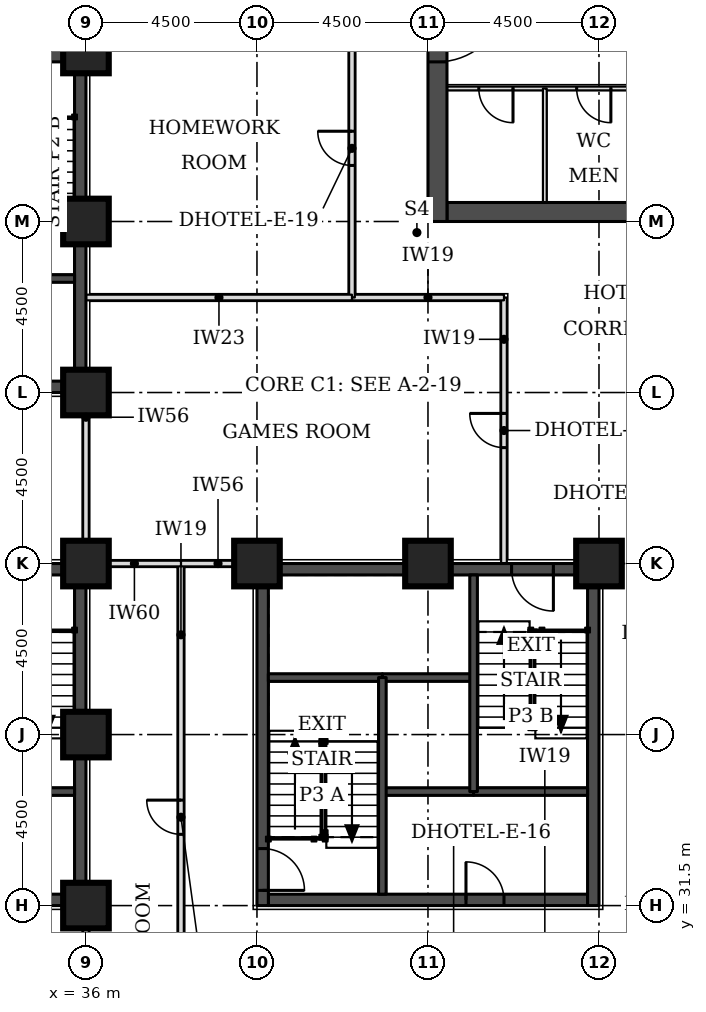
"""IFC4 building model, lengths in metres.
Left out: names, types, materials, properties, quantities, classifications, styles, units other than length and angle.
Written with IfcOpenShell. Run it as: python <this file> out.ifc"""

import sys

from ifc_helpers import new_model, si_unit, direction, frame, frame_2d, origin, origin_2d, place, context, subcontext, project, spatial, rectangle, extrude, element, fill, save


model = new_model("IFC4")
c1 = context("Model", 3, precision=1e-05, world=origin(), true_north=direction((0.0, 1.0)))
c2 = subcontext(c1, "Body", "Model", "MODEL_VIEW")
j1 = project(units=[si_unit("LENGTHUNIT", "METRE"), si_unit("PLANEANGLEUNIT", "RADIAN")], contexts=[c1])
p1 = place(None, origin())
s1 = spatial("IfcSite", under=j1, at=p1, CompositionType="ELEMENT")
p2 = place(p1, origin())
s2 = spatial("IfcBuilding", under=s1, at=p2, CompositionType="ELEMENT")
p3 = place(p2, frame((0.0, 0.0, 62.7)))
s3 = spatial("IfcBuildingStorey", under=s2, at=p3, CompositionType="ELEMENT", Elevation=62.7)
for number, where, z_axis, x_axis in (
    (1, (36.0, 31.5, 0.0), (0.0, 0.0, 1.0), (1.0, 0.0, 0.0)),
    (2, (36.0, 36.0, 0.0), (0.0, 0.0, 1.0), (1.0, 0.0, 0.0)),
    (3, (36.0, 40.5, 0.0), (0.0, 0.0, 1.0), (1.0, 0.0, 0.0)),
    (4, (40.5, 40.5, 0.0), (0.0, 0.0, 1.0), (1.0, 0.0, 0.0)),
    (5, (45.0, 40.5, 0.0), (0.0, 0.0, 1.0), (1.0, 0.0, 0.0)),
    (6, (49.5, 40.5, 0.0), (0.0, 0.0, 1.0), (1.0, 0.0, 0.0)),
    (7, (36.0, 45.0, 0.0), (0.0, 0.0, 1.0), (1.0, 0.0, 0.0)),
    (8, (36.0, 49.5, 0.0), (0.0, 0.0, 1.0), (1.0, 0.0, 0.0)),
    (9, (36.0, 54.0, 0.0), (0.0, 0.0, 1.0), (1.0, 0.0, 0.0)),
):
    element("IfcColumn", number, at=place(p3, frame(where, z_axis=z_axis, x_axis=x_axis)), inside=s3, PredefinedType="COLUMN", context=c2, shape_type="SweptSolid", body=[
        extrude(rectangle(XDim=1.2, YDim=1.2, at=origin_2d()), origin(), (0.0, 0.0, 1.0), 3.3),
    ])
p4 = place(p3, frame((45.5, 49.75, 0.0), z_axis=(0.0, 0.0, 1.0), x_axis=(1.0, 0.0, 0.0)))
e10 = element("IfcWall", 10, at=p4, inside=s3, PredefinedType="SHEAR", context=c2, shape_type="SweptSolid", body=[
    extrude(rectangle(XDim=21.5, YDim=0.5, at=frame_2d((10.75, 0.0))), origin(), (0.0, 0.0, 1.0), 3.3),
])
p5 = place(p3, frame((45.25, 49.5, 0.0), z_axis=(0.0, 0.0, 1.0), x_axis=(0.0, 1.0, 0.0)))
e11 = element("IfcWall", 11, at=p5, inside=s3, PredefinedType="SHEAR", context=c2, shape_type="SweptSolid", body=[
    extrude(rectangle(XDim=22.5, YDim=0.5, at=frame_2d((11.25, 0.0))), origin(), (0.0, 0.0, 1.0), 3.3),
])
p6 = place(p5, frame((4.2, 0.0, 0.0)))
e12 = element("IfcOpeningElement", 12, at=p6, cuts=e11, PredefinedType="OPENING", context=c2, shape_type="SweptSolid", body=[
    extrude(rectangle(XDim=1.8, YDim=2.1, at=frame_2d((0.9, 1.05))), frame((0.0, 0.26, 0.0), z_axis=(0.0, -1.0, 0.0), x_axis=(1.0, 0.0, 0.0)), (0.0, 0.0, 1.0), 0.52),
])
p7 = place(p5, frame((6.9, 0.0, 0.0)))
e13 = element("IfcOpeningElement", 13, at=p7, cuts=e11, PredefinedType="OPENING", context=c2, shape_type="SweptSolid", body=[
    extrude(rectangle(XDim=1.1, YDim=2.1, at=frame_2d((0.55, 1.05))), frame((0.0, 0.26, 0.0), z_axis=(0.0, -1.0, 0.0), x_axis=(1.0, 0.0, 0.0)), (0.0, 0.0, 1.0), 0.52),
])
p8 = place(p5, frame((13.6, 0.0, 0.0)))
e14 = element("IfcOpeningElement", 14, at=p8, cuts=e11, PredefinedType="OPENING", context=c2, shape_type="SweptSolid", body=[
    extrude(rectangle(XDim=1.1, YDim=2.1, at=frame_2d((0.55, 1.05))), frame((0.0, 0.26, 0.0), z_axis=(0.0, -1.0, 0.0), x_axis=(1.0, 0.0, 0.0)), (0.0, 0.0, 1.0), 0.52),
])
p9 = place(p5, frame((16.5, 0.0, 0.0)))
e15 = element("IfcOpeningElement", 15, at=p9, cuts=e11, PredefinedType="OPENING", context=c2, shape_type="SweptSolid", body=[
    extrude(rectangle(XDim=1.8, YDim=2.1, at=frame_2d((0.9, 1.05))), frame((0.0, 0.26, 0.0), z_axis=(0.0, -1.0, 0.0), x_axis=(1.0, 0.0, 0.0)), (0.0, 0.0, 1.0), 0.52),
])
p10 = place(p3, frame((27.3, 45.15, 0.0), z_axis=(0.0, 0.0, 1.0), x_axis=(1.0, 0.0, 0.0)))
e16 = element("IfcWall", 16, at=p10, inside=s3, PredefinedType="SHEAR", context=c2, shape_type="SweptSolid", body=[
    extrude(rectangle(XDim=8.4, YDim=0.3, at=frame_2d((4.2, 0.0))), origin(), (0.0, 0.0, 1.0), 3.3),
])
p11 = place(p10, frame((5.2, 0.0, 0.0)))
e17 = element("IfcOpeningElement", 17, at=p11, cuts=e16, PredefinedType="OPENING", context=c2, shape_type="SweptSolid", body=[
    extrude(rectangle(XDim=1.0, YDim=2.1, at=frame_2d((0.5, 1.05))), frame((0.0, 0.16, 0.0), z_axis=(0.0, -1.0, 0.0), x_axis=(1.0, 0.0, 0.0)), (0.0, 0.0, 1.0), 0.32),
])
p12 = place(p3, frame((27.3, 53.85, 0.0), z_axis=(0.0, 0.0, 1.0), x_axis=(1.0, 0.0, 0.0)))
e18 = element("IfcWall", 18, at=p12, inside=s3, PredefinedType="SHEAR", context=c2, shape_type="SweptSolid", body=[
    extrude(rectangle(XDim=8.4, YDim=0.3, at=frame_2d((4.2, 0.0))), origin(), (0.0, 0.0, 1.0), 3.3),
])
p13 = place(p12, frame((6.4, 0.0, 0.0)))
e19 = element("IfcOpeningElement", 19, at=p13, cuts=e18, PredefinedType="OPENING", context=c2, shape_type="SweptSolid", body=[
    extrude(rectangle(XDim=1.1, YDim=2.1, at=frame_2d((0.55, 1.05))), frame((0.0, 0.16, 0.0), z_axis=(0.0, -1.0, 0.0), x_axis=(1.0, 0.0, 0.0)), (0.0, 0.0, 1.0), 0.32),
])
p14 = place(p3, frame((35.85, 45.0, 0.0), z_axis=(0.0, 0.0, 1.0), x_axis=(0.0, 1.0, 0.0)))
e20 = element("IfcWall", 20, at=p14, inside=s3, PredefinedType="SHEAR", context=c2, shape_type="SweptSolid", body=[
    extrude(rectangle(XDim=9.0, YDim=0.3, at=frame_2d((4.5, 0.0))), origin(), (0.0, 0.0, 1.0), 3.3),
])
p15 = place(p3, frame((40.8, 31.65, 0.0), z_axis=(0.0, 0.0, 1.0), x_axis=(1.0, 0.0, 0.0)))
e21 = element("IfcWall", 21, at=p15, inside=s3, PredefinedType="SHEAR", context=c2, shape_type="SweptSolid", body=[
    extrude(rectangle(XDim=8.4, YDim=0.3, at=frame_2d((4.2, 0.0))), origin(), (0.0, 0.0, 1.0), 3.3),
])
p16 = place(p15, frame((5.2, 0.0, 0.0)))
e22 = element("IfcOpeningElement", 22, at=p16, cuts=e21, PredefinedType="OPENING", context=c2, shape_type="SweptSolid", body=[
    extrude(rectangle(XDim=1.0, YDim=2.1, at=frame_2d((0.5, 1.05))), frame((0.0, 0.16, 0.0), z_axis=(0.0, -1.0, 0.0), x_axis=(1.0, 0.0, 0.0)), (0.0, 0.0, 1.0), 0.32),
])
p17 = place(p3, frame((40.8, 40.35, 0.0), z_axis=(0.0, 0.0, 1.0), x_axis=(1.0, 0.0, 0.0)))
e23 = element("IfcWall", 23, at=p17, inside=s3, PredefinedType="SHEAR", context=c2, shape_type="SweptSolid", body=[
    extrude(rectangle(XDim=8.4, YDim=0.3, at=frame_2d((4.2, 0.0))), origin(), (0.0, 0.0, 1.0), 3.3),
])
p18 = place(p17, frame((6.4, 0.0, 0.0)))
e24 = element("IfcOpeningElement", 24, at=p18, cuts=e23, PredefinedType="OPENING", context=c2, shape_type="SweptSolid", body=[
    extrude(rectangle(XDim=1.1, YDim=2.1, at=frame_2d((0.55, 1.05))), frame((0.0, 0.16, 0.0), z_axis=(0.0, -1.0, 0.0), x_axis=(1.0, 0.0, 0.0)), (0.0, 0.0, 1.0), 0.32),
])
p19 = place(p3, frame((40.65, 31.5, 0.0), z_axis=(0.0, 0.0, 1.0), x_axis=(0.0, 1.0, 0.0)))
e25 = element("IfcWall", 25, at=p19, inside=s3, PredefinedType="SHEAR", context=c2, shape_type="SweptSolid", body=[
    extrude(rectangle(XDim=9.0, YDim=0.3, at=frame_2d((4.5, 0.0))), origin(), (0.0, 0.0, 1.0), 3.3),
])
p20 = place(p19, frame((0.4, 0.0, 0.0)))
e26 = element("IfcOpeningElement", 26, at=p20, cuts=e25, PredefinedType="OPENING", context=c2, shape_type="SweptSolid", body=[
    extrude(rectangle(XDim=1.1, YDim=2.1, at=frame_2d((0.55, 1.05))), frame((0.0, 0.16, 0.0), z_axis=(0.0, -1.0, 0.0), x_axis=(1.0, 0.0, 0.0)), (0.0, 0.0, 1.0), 0.32),
])
p21 = place(p3, frame((49.35, 31.5, 0.0), z_axis=(0.0, 0.0, 1.0), x_axis=(0.0, 1.0, 0.0)))
e27 = element("IfcWall", 27, at=p21, inside=s3, PredefinedType="SHEAR", context=c2, shape_type="SweptSolid", body=[
    extrude(rectangle(XDim=9.0, YDim=0.3, at=frame_2d((4.5, 0.0))), origin(), (0.0, 0.0, 1.0), 3.3),
])
p22 = place(p3, frame((27.3, 31.65, 0.0), z_axis=(0.0, 0.0, 1.0), x_axis=(1.0, 0.0, 0.0)))
e28 = element("IfcWall", 28, at=p22, inside=s3, PredefinedType="SHEAR", context=c2, shape_type="SweptSolid", body=[
    extrude(rectangle(XDim=8.4, YDim=0.3, at=frame_2d((4.2, 0.0))), origin(), (0.0, 0.0, 1.0), 3.3),
])
p23 = place(p22, frame((4.8, 0.0, 0.0)))
e29 = element("IfcOpeningElement", 29, at=p23, cuts=e28, PredefinedType="OPENING", context=c2, shape_type="SweptSolid", body=[
    extrude(rectangle(XDim=1.8, YDim=2.1, at=frame_2d((0.9, 1.05))), frame((0.0, 0.16, 0.0), z_axis=(0.0, -1.0, 0.0), x_axis=(1.0, 0.0, 0.0)), (0.0, 0.0, 1.0), 0.32),
])
p24 = place(p3, frame((27.3, 40.35, 0.0), z_axis=(0.0, 0.0, 1.0), x_axis=(1.0, 0.0, 0.0)))
e30 = element("IfcWall", 30, at=p24, inside=s3, PredefinedType="SHEAR", context=c2, shape_type="SweptSolid", body=[
    extrude(rectangle(XDim=8.4, YDim=0.3, at=frame_2d((4.2, 0.0))), origin(), (0.0, 0.0, 1.0), 3.3),
])
p25 = place(p24, frame((6.4, 0.0, 0.0)))
e31 = element("IfcOpeningElement", 31, at=p25, cuts=e30, PredefinedType="OPENING", context=c2, shape_type="SweptSolid", body=[
    extrude(rectangle(XDim=1.1, YDim=2.1, at=frame_2d((0.55, 1.05))), frame((0.0, 0.16, 0.0), z_axis=(0.0, -1.0, 0.0), x_axis=(1.0, 0.0, 0.0)), (0.0, 0.0, 1.0), 0.32),
])
p26 = place(p3, frame((35.85, 31.5, 0.0), z_axis=(0.0, 0.0, 1.0), x_axis=(0.0, 1.0, 0.0)))
e32 = element("IfcWall", 32, at=p26, inside=s3, PredefinedType="SHEAR", context=c2, shape_type="SweptSolid", body=[
    extrude(rectangle(XDim=9.0, YDim=0.3, at=frame_2d((4.5, 0.0))), origin(), (0.0, 0.0, 1.0), 3.3),
])
p27 = place(p3, frame((38.5, 27.15, 0.0), z_axis=(0.0, 0.0, 1.0), x_axis=(0.0, 1.0, 0.0)))
e33 = element("IfcWall", 33, at=p27, inside=s3, PredefinedType="PARTITIONING", context=c2, shape_type="SweptSolid", body=[
    extrude(rectangle(XDim=13.35, YDim=0.15, at=frame_2d((6.675, 0.0))), origin(), (0.0, 0.0, 1.0), 3.08),
])
p28 = place(p27, frame((6.225, 0.0, 0.0)))
e34 = element("IfcOpeningElement", 34, at=p28, cuts=e33, PredefinedType="OPENING", context=c2, shape_type="SweptSolid", body=[
    extrude(rectangle(XDim=0.9, YDim=2.1, at=frame_2d((0.45, 1.05))), frame((0.0, 0.085, 0.0), z_axis=(0.0, -1.0, 0.0), x_axis=(1.0, 0.0, 0.0)), (0.0, 0.0, 1.0), 0.17),
])
for number, where, z_axis, x_axis in (
    (35, (36.0, 29.5, 0.0), (0.0, 0.0, 1.0), (0.0, 1.0, 0.0)),
    (36, (38.5, 40.5, 0.0), (0.0, 0.0, 1.0), (1.0, 0.0, 0.0)),
):
    element("IfcWall", number, at=place(p3, frame(where, z_axis=z_axis, x_axis=x_axis)), inside=s3, PredefinedType="PARTITIONING", context=c2, shape_type="SweptSolid", body=[
        extrude(rectangle(XDim=1.95, YDim=0.15, at=frame_2d((0.975, 0.0))), origin(), (0.0, 0.0, 1.0), 2.33),
    ])
p29 = place(p3, frame((36.0, 40.55, 0.0), z_axis=(0.0, 0.0, 1.0), x_axis=(0.0, 1.0, 0.0)))
e37 = element("IfcWall", 37, at=p29, inside=s3, PredefinedType="PARTITIONING", context=c2, shape_type="SweptSolid", body=[
    extrude(rectangle(XDim=4.4, YDim=0.15, at=frame_2d((2.2, 0.0))), origin(), (0.0, 0.0, 1.0), 2.33),
])
p30 = place(p3, frame((47.0, 40.5, 0.0), z_axis=(0.0, 0.0, 1.0), x_axis=(0.0, 1.0, 0.0)))
e38 = element("IfcWall", 38, at=p30, inside=s3, PredefinedType="PARTITIONING", context=c2, shape_type="SweptSolid", body=[
    extrude(rectangle(XDim=7.0, YDim=0.15, at=frame_2d((3.5, 0.0))), origin(), (0.0, 0.0, 1.0), 3.08),
])
p31 = place(p30, frame((3.05, 0.0, 0.0)))
e39 = element("IfcOpeningElement", 39, at=p31, cuts=e38, PredefinedType="OPENING", context=c2, shape_type="SweptSolid", body=[
    extrude(rectangle(XDim=0.9, YDim=2.1, at=frame_2d((0.45, 1.05))), frame((0.0, 0.085, 0.0), z_axis=(0.0, -1.0, 0.0), x_axis=(1.0, 0.0, 0.0)), (0.0, 0.0, 1.0), 0.17),
])
p32 = place(p3, frame((43.0, 47.5, 0.0), z_axis=(0.0, 0.0, 1.0), x_axis=(1.0, 0.0, 0.0)))
e40 = element("IfcWall", 40, at=p32, inside=s3, PredefinedType="PARTITIONING", context=c2, shape_type="SweptSolid", body=[
    extrude(rectangle(XDim=4.0, YDim=0.15, at=frame_2d((2.0, 0.0))), origin(), (0.0, 0.0, 1.0), 3.08),
])
p33 = place(p3, frame((43.0, 47.5, 0.0), z_axis=(0.0, 0.0, 1.0), x_axis=(0.0, 1.0, 0.0)))
e41 = element("IfcWall", 41, at=p33, inside=s3, PredefinedType="PARTITIONING", context=c2, shape_type="SweptSolid", body=[
    extrude(rectangle(XDim=7.85, YDim=0.15, at=frame_2d((3.925, 0.0))), origin(), (0.0, 0.0, 1.0), 3.08),
])
p34 = place(p33, frame((3.475, 0.0, 0.0)))
e42 = element("IfcOpeningElement", 42, at=p34, cuts=e41, PredefinedType="OPENING", context=c2, shape_type="SweptSolid", body=[
    extrude(rectangle(XDim=0.9, YDim=2.1, at=frame_2d((0.45, 1.05))), frame((0.0, 0.085, 0.0), z_axis=(0.0, -1.0, 0.0), x_axis=(1.0, 0.0, 0.0)), (0.0, 0.0, 1.0), 0.17),
])
p35 = place(p3, frame((36.05, 40.5, 0.0), z_axis=(0.0, 0.0, 1.0), x_axis=(1.0, 0.0, 0.0)))
e43 = element("IfcWall", 43, at=p35, inside=s3, PredefinedType="PARTITIONING", context=c2, shape_type="SweptSolid", body=[
    extrude(rectangle(XDim=2.45, YDim=0.15, at=frame_2d((1.225, 0.0))), origin(), (0.0, 0.0, 1.0), 2.33),
])
p36 = place(p3, frame((36.0, 47.5, 0.0), z_axis=(0.0, 0.0, 1.0), x_axis=(1.0, 0.0, 0.0)))
e44 = element("IfcWall", 44, at=p36, inside=s3, PredefinedType="PARTITIONING", context=c2, shape_type="SweptSolid", body=[
    extrude(rectangle(XDim=7.0, YDim=0.15, at=frame_2d((3.5, 0.0))), origin(), (0.0, 0.0, 1.0), 3.08),
])
p37 = place(p3, frame((45.5, 53.0, 0.0), z_axis=(0.0, 0.0, 1.0), x_axis=(1.0, 0.0, 0.0)))
e45 = element("IfcWall", 45, at=p37, inside=s3, PredefinedType="PARTITIONING", context=c2, shape_type="SweptSolid", body=[
    extrude(rectangle(XDim=5.15, YDim=0.1, at=frame_2d((2.575, 0.0))), origin(), (0.0, 0.0, 1.0), 3.08),
])
p38 = place(p37, frame((0.837, 0.0, 0.0)))
e46 = element("IfcOpeningElement", 46, at=p38, cuts=e45, PredefinedType="OPENING", context=c2, shape_type="SweptSolid", body=[
    extrude(rectangle(XDim=0.9, YDim=2.1, at=frame_2d((0.45, 1.05))), frame((0.0, 0.06, 0.0), z_axis=(0.0, -1.0, 0.0), x_axis=(1.0, 0.0, 0.0)), (0.0, 0.0, 1.0), 0.12),
])
p39 = place(p37, frame((3.413, 0.0, 0.0)))
e47 = element("IfcOpeningElement", 47, at=p39, cuts=e45, PredefinedType="OPENING", context=c2, shape_type="SweptSolid", body=[
    extrude(rectangle(XDim=0.9, YDim=2.1, at=frame_2d((0.45, 1.05))), frame((0.0, 0.06, 0.0), z_axis=(0.0, -1.0, 0.0), x_axis=(1.0, 0.0, 0.0)), (0.0, 0.0, 1.0), 0.12),
])
p40 = place(p3, frame((48.075, 50.0, 0.0), z_axis=(0.0, 0.0, 1.0), x_axis=(0.0, 1.0, 0.0)))
e48 = element("IfcWall", 48, at=p40, inside=s3, PredefinedType="PARTITIONING", context=c2, shape_type="SweptSolid", body=[
    extrude(rectangle(XDim=3.0, YDim=0.1, at=frame_2d((1.5, 0.0))), origin(), (0.0, 0.0, 1.0), 3.08),
])
p41 = place(p3, frame((32.7, 48.0, 0.0), z_axis=(0.0, 0.0, 1.0), x_axis=(1.0, 0.0, 0.0)))
e49 = element("IfcWall", 49, at=p41, inside=s3, PredefinedType="SOLIDWALL", context=c2, shape_type="SweptSolid", body=[
    extrude(rectangle(XDim=3.0, YDim=0.2, at=frame_2d((1.5, 0.0))), origin(), (0.0, 0.0, 1.0), 3.08),
])
p42 = place(p3, frame((43.8, 34.5, 0.0), z_axis=(0.0, 0.0, 1.0), x_axis=(1.0, 0.0, 0.0)))
e50 = element("IfcWall", 50, at=p42, inside=s3, PredefinedType="SOLIDWALL", context=c2, shape_type="SweptSolid", body=[
    extrude(rectangle(XDim=2.4, YDim=0.2, at=frame_2d((1.2, 0.0))), origin(), (0.0, 0.0, 1.0), 3.08),
])
p43 = place(p3, frame((46.2, 34.5, 0.0), z_axis=(0.0, 0.0, 1.0), x_axis=(1.0, 0.0, 0.0)))
e51 = element("IfcWall", 51, at=p43, inside=s3, PredefinedType="SOLIDWALL", context=c2, shape_type="SweptSolid", body=[
    extrude(rectangle(XDim=3.0, YDim=0.2, at=frame_2d((1.5, 0.0))), origin(), (0.0, 0.0, 1.0), 3.08),
])
p44 = place(p3, frame((43.8, 37.5, 0.0), z_axis=(0.0, 0.0, 1.0), x_axis=(1.0, 0.0, 0.0)))
e52 = element("IfcWall", 52, at=p44, inside=s3, PredefinedType="SOLIDWALL", context=c2, shape_type="SweptSolid", body=[
    extrude(rectangle(XDim=2.4, YDim=0.2, at=frame_2d((1.2, 0.0))), origin(), (0.0, 0.0, 1.0), 3.3),
])
p45 = place(p3, frame((40.8, 37.5, 0.0), z_axis=(0.0, 0.0, 1.0), x_axis=(1.0, 0.0, 0.0)))
e53 = element("IfcWall", 53, at=p45, inside=s3, PredefinedType="SOLIDWALL", context=c2, shape_type="SweptSolid", body=[
    extrude(rectangle(XDim=3.0, YDim=0.2, at=frame_2d((1.5, 0.0))), origin(), (0.0, 0.0, 1.0), 3.08),
])
for number, where, z_axis, x_axis in (
    (54, (43.8, 31.8, 0.0), (0.0, 0.0, 1.0), (0.0, 1.0, 0.0)),
    (55, (46.2, 34.5, 0.0), (0.0, 0.0, 1.0), (0.0, 1.0, 0.0)),
):
    element("IfcWall", number, at=place(p3, frame(where, z_axis=z_axis, x_axis=x_axis)), inside=s3, PredefinedType="SOLIDWALL", context=c2, shape_type="SweptSolid", body=[
        extrude(rectangle(XDim=5.7, YDim=0.2, at=frame_2d((2.85, 0.0))), origin(), (0.0, 0.0, 1.0), 3.08),
    ])
p46 = place(p3, frame((30.3, 34.5, 0.0), z_axis=(0.0, 0.0, 1.0), x_axis=(1.0, 0.0, 0.0)))
e56 = element("IfcWall", 56, at=p46, inside=s3, PredefinedType="SOLIDWALL", context=c2, shape_type="SweptSolid", body=[
    extrude(rectangle(XDim=5.4, YDim=0.2, at=frame_2d((2.7, 0.0))), origin(), (0.0, 0.0, 1.0), 3.08),
])
p47 = place(p46, frame((0.45, 0.0, 0.0)))
e57 = element("IfcOpeningElement", 57, at=p47, cuts=e56, PredefinedType="OPENING", context=c2, shape_type="SweptSolid", body=[
    extrude(rectangle(XDim=1.5, YDim=2.1, at=frame_2d((0.75, 1.05))), frame((0.0, 0.11, 0.0), z_axis=(0.0, -1.0, 0.0), x_axis=(1.0, 0.0, 0.0)), (0.0, 0.0, 1.0), 0.22),
])
p48 = place(p28, origin())
e58 = element("IfcDoor", 58, at=p48, inside=s3, OperationType="SINGLE_SWING_RIGHT", PredefinedType="DOOR", context=c2, shape_type="SweptSolid", body=[
    extrude(rectangle(XDim=0.9, YDim=2.1, at=frame_2d((0.45, 1.05))), frame((0.0, 0.025, 0.0), z_axis=(0.0, -1.0, 0.0), x_axis=(1.0, 0.0, 0.0)), (0.0, 0.0, 1.0), 0.05),
])
fill(e34, e58)
p49 = place(p34, origin())
e59 = element("IfcDoor", 59, at=p49, inside=s3, OperationType="SINGLE_SWING_RIGHT", PredefinedType="DOOR", context=c2, shape_type="SweptSolid", body=[
    extrude(rectangle(XDim=0.9, YDim=2.1, at=frame_2d((0.45, 1.05))), frame((0.0, 0.025, 0.0), z_axis=(0.0, -1.0, 0.0), x_axis=(1.0, 0.0, 0.0)), (0.0, 0.0, 1.0), 0.05),
])
fill(e42, e59)
p50 = place(p31, origin())
e60 = element("IfcDoor", 60, at=p50, inside=s3, OperationType="SINGLE_SWING_RIGHT", PredefinedType="DOOR", context=c2, shape_type="SweptSolid", body=[
    extrude(rectangle(XDim=0.9, YDim=2.1, at=frame_2d((0.45, 1.05))), frame((0.0, 0.025, 0.0), z_axis=(0.0, -1.0, 0.0), x_axis=(1.0, 0.0, 0.0)), (0.0, 0.0, 1.0), 0.05),
])
fill(e39, e60)
p51 = place(p6, frame((1.8, 0.0, 0.0), z_axis=(0.0, 0.0, 1.0), x_axis=(-1.0, 0.0, 0.0)))
e61 = element("IfcDoor", 61, at=p51, inside=s3, OperationType="SINGLE_SWING_LEFT", PredefinedType="DOOR", context=c2, shape_type="SweptSolid", body=[
    extrude(rectangle(XDim=1.8, YDim=2.1, at=frame_2d((0.9, 1.05))), frame((0.0, 0.025, 0.0), z_axis=(0.0, -1.0, 0.0), x_axis=(1.0, 0.0, 0.0)), (0.0, 0.0, 1.0), 0.05),
])
fill(e12, e61)
p52 = place(p38, frame((0.9, 0.0, 0.0), z_axis=(0.0, 0.0, 1.0), x_axis=(-1.0, 0.0, 0.0)))
e62 = element("IfcDoor", 62, at=p52, inside=s3, OperationType="SINGLE_SWING_LEFT", PredefinedType="DOOR", context=c2, shape_type="SweptSolid", body=[
    extrude(rectangle(XDim=0.9, YDim=2.1, at=frame_2d((0.45, 1.05))), frame((0.0, 0.025, 0.0), z_axis=(0.0, -1.0, 0.0), x_axis=(1.0, 0.0, 0.0)), (0.0, 0.0, 1.0), 0.05),
])
fill(e46, e62)
p53 = place(p39, frame((0.9, 0.0, 0.0), z_axis=(0.0, 0.0, 1.0), x_axis=(-1.0, 0.0, 0.0)))
e63 = element("IfcDoor", 63, at=p53, inside=s3, OperationType="SINGLE_SWING_LEFT", PredefinedType="DOOR", context=c2, shape_type="SweptSolid", body=[
    extrude(rectangle(XDim=0.9, YDim=2.1, at=frame_2d((0.45, 1.05))), frame((0.0, 0.025, 0.0), z_axis=(0.0, -1.0, 0.0), x_axis=(1.0, 0.0, 0.0)), (0.0, 0.0, 1.0), 0.05),
])
fill(e47, e63)
p54 = place(p20, frame((1.1, 0.0, 0.0), z_axis=(0.0, 0.0, 1.0), x_axis=(-1.0, 0.0, 0.0)))
e64 = element("IfcDoor", 64, at=p54, inside=s3, OperationType="SINGLE_SWING_RIGHT", PredefinedType="DOOR", context=c2, shape_type="SweptSolid", body=[
    extrude(rectangle(XDim=1.1, YDim=2.1, at=frame_2d((0.55, 1.05))), frame((0.0, 0.025, 0.0), z_axis=(0.0, -1.0, 0.0), x_axis=(1.0, 0.0, 0.0)), (0.0, 0.0, 1.0), 0.05),
])
fill(e26, e64)
p55 = place(p18, frame((1.1, 0.0, 0.0), z_axis=(0.0, 0.0, 1.0), x_axis=(-1.0, 0.0, 0.0)))
e65 = element("IfcDoor", 65, at=p55, inside=s3, OperationType="SINGLE_SWING_LEFT", PredefinedType="DOOR", context=c2, shape_type="SweptSolid", body=[
    extrude(rectangle(XDim=1.1, YDim=2.1, at=frame_2d((0.55, 1.05))), frame((0.0, 0.025, 0.0), z_axis=(0.0, -1.0, 0.0), x_axis=(1.0, 0.0, 0.0)), (0.0, 0.0, 1.0), 0.05),
])
fill(e24, e65)
p56 = place(p16, origin())
e66 = element("IfcDoor", 66, at=p56, inside=s3, OperationType="SINGLE_SWING_LEFT", PredefinedType="DOOR", context=c2, shape_type="SweptSolid", body=[
    extrude(rectangle(XDim=1.0, YDim=2.1, at=frame_2d((0.5, 1.05))), frame((0.0, 0.025, 0.0), z_axis=(0.0, -1.0, 0.0), x_axis=(1.0, 0.0, 0.0)), (0.0, 0.0, 1.0), 0.05),
])
fill(e22, e66)
save(model, sys.argv[1])
